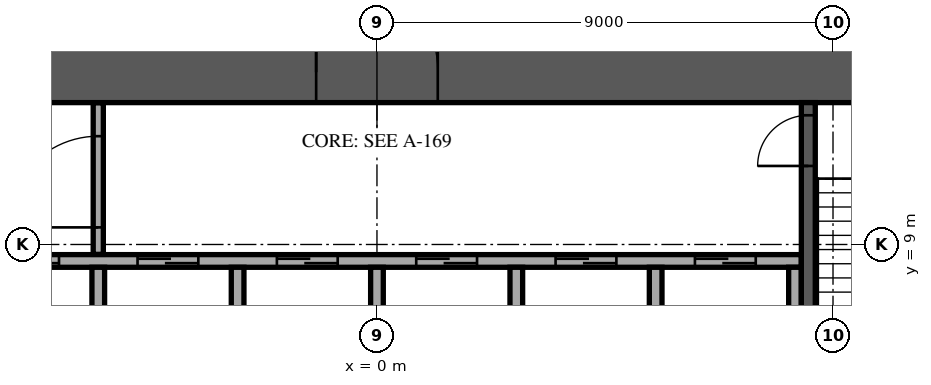
"""IFC4 building model, lengths in metres.
Left out: names, types, materials, properties, quantities, classifications, styles, units other than length and angle.
Written with IfcOpenShell. Run it as: python <this file> out.ifc"""

import sys

from ifc_helpers import new_model, si_unit, direction, frame, frame_2d, origin, place, context, subcontext, project, spatial, rectangle, extrude, element, fill, save


model = new_model("IFC4")
c1 = context("Model", 3, precision=1e-05, world=origin(), true_north=direction((0.0, 1.0)))
c2 = subcontext(c1, "Body", "Model", "MODEL_VIEW")
j1 = project(units=[si_unit("LENGTHUNIT", "METRE"), si_unit("PLANEANGLEUNIT", "RADIAN")], contexts=[c1])
p1 = place(None, origin())
s1 = spatial("IfcSite", under=j1, at=p1, CompositionType="ELEMENT")
p2 = place(p1, origin())
s2 = spatial("IfcBuilding", under=s1, at=p2, CompositionType="ELEMENT")
p3 = place(p2, frame((0.0, 0.0, 27.3)))
s3 = spatial("IfcBuildingStorey", under=s2, at=p3, CompositionType="ELEMENT", Elevation=27.3)
p4 = place(p3, frame((-13.0, 12.4, 0.0), z_axis=(0.0, 0.0, 1.0), x_axis=(1.0, 0.0, 0.0)))
e1 = element("IfcWall", 1, at=p4, inside=s3, PredefinedType="SHEAR", context=c2, shape_type="SweptSolid", body=[
    extrude(rectangle(XDim=26.0, YDim=1.2, at=frame_2d((13.0, 0.0))), origin(), (0.0, 0.0, 1.0), 4.35),
])
p5 = place(p4, frame((11.8, 0.0, 0.0)))
e2 = element("IfcOpeningElement", 2, at=p5, cuts=e1, PredefinedType="OPENING", context=c2, shape_type="SweptSolid", body=[
    extrude(rectangle(XDim=2.4, YDim=2.4, at=frame_2d((1.2, 1.2))), frame((0.0, 0.61, 0.0), z_axis=(0.0, -1.0, 0.0), x_axis=(1.0, 0.0, 0.0)), (0.0, 0.0, 1.0), 1.22),
])
p6 = place(p4, frame((22.625, 0.0, 0.0)))
e3 = element("IfcOpeningElement", 3, at=p6, cuts=e1, PredefinedType="OPENING", context=c2, shape_type="SweptSolid", body=[
    extrude(rectangle(XDim=1.2, YDim=2.1, at=frame_2d((0.6, 1.05))), frame((0.0, 0.61, 0.0), z_axis=(0.0, -1.0, 0.0), x_axis=(1.0, 0.0, 0.0)), (0.0, 0.0, 1.0), 1.22),
])
p7 = place(p4, frame((1.6, 0.0, 0.0)))
e4 = element("IfcOpeningElement", 4, at=p7, cuts=e1, PredefinedType="OPENING", context=c2, shape_type="SweptSolid", body=[
    extrude(rectangle(XDim=1.0, YDim=2.1, at=frame_2d((0.5, 1.05))), frame((0.0, 0.61, 0.0), z_axis=(0.0, -1.0, 0.0), x_axis=(1.0, 0.0, 0.0)), (0.0, 0.0, 1.0), 1.22),
])
p8 = place(p3, frame((-8.375, 8.675, 0.0), z_axis=(0.0, 0.0, 1.0), x_axis=(1.0, 0.0, 0.0)))
e5 = element("IfcWall", 5, at=p8, inside=s3, PredefinedType="SOLIDWALL", context=c2, shape_type="SweptSolid", body=[
    extrude(rectangle(XDim=16.75, YDim=0.25, at=frame_2d((8.375, 0.0))), origin(), (0.0, 0.0, 1.0), 4.35),
])
p9 = place(p8, frame((0.9, 0.0, 0.0)))
e6 = element("IfcOpeningElement", 6, at=p9, cuts=e5, PredefinedType="OPENING", context=c2, shape_type="SweptSolid", body=[
    extrude(rectangle(XDim=1.2, YDim=2.1, at=frame_2d((0.6, 1.05))), frame((0.0, 0.135, 0.0), z_axis=(0.0, -1.0, 0.0), x_axis=(1.0, 0.0, 0.0)), (0.0, 0.0, 1.0), 0.27),
])
p10 = place(p8, frame((3.65, 0.0, 0.0)))
e7 = element("IfcOpeningElement", 7, at=p10, cuts=e5, PredefinedType="OPENING", context=c2, shape_type="SweptSolid", body=[
    extrude(rectangle(XDim=1.2, YDim=2.1, at=frame_2d((0.6, 1.05))), frame((0.0, 0.135, 0.0), z_axis=(0.0, -1.0, 0.0), x_axis=(1.0, 0.0, 0.0)), (0.0, 0.0, 1.0), 0.27),
])
p11 = place(p8, frame((6.4, 0.0, 0.0)))
e8 = element("IfcOpeningElement", 8, at=p11, cuts=e5, PredefinedType="OPENING", context=c2, shape_type="SweptSolid", body=[
    extrude(rectangle(XDim=1.2, YDim=2.1, at=frame_2d((0.6, 1.05))), frame((0.0, 0.135, 0.0), z_axis=(0.0, -1.0, 0.0), x_axis=(1.0, 0.0, 0.0)), (0.0, 0.0, 1.0), 0.27),
])
p12 = place(p8, frame((9.15, 0.0, 0.0)))
e9 = element("IfcOpeningElement", 9, at=p12, cuts=e5, PredefinedType="OPENING", context=c2, shape_type="SweptSolid", body=[
    extrude(rectangle(XDim=1.2, YDim=2.1, at=frame_2d((0.6, 1.05))), frame((0.0, 0.135, 0.0), z_axis=(0.0, -1.0, 0.0), x_axis=(1.0, 0.0, 0.0)), (0.0, 0.0, 1.0), 0.27),
])
p13 = place(p8, frame((11.9, 0.0, 0.0)))
e10 = element("IfcOpeningElement", 10, at=p13, cuts=e5, PredefinedType="OPENING", context=c2, shape_type="SweptSolid", body=[
    extrude(rectangle(XDim=1.2, YDim=2.1, at=frame_2d((0.6, 1.05))), frame((0.0, 0.135, 0.0), z_axis=(0.0, -1.0, 0.0), x_axis=(1.0, 0.0, 0.0)), (0.0, 0.0, 1.0), 0.27),
])
p14 = place(p8, frame((14.65, 0.0, 0.0)))
e11 = element("IfcOpeningElement", 11, at=p14, cuts=e5, PredefinedType="OPENING", context=c2, shape_type="SweptSolid", body=[
    extrude(rectangle(XDim=1.2, YDim=2.1, at=frame_2d((0.6, 1.05))), frame((0.0, 0.135, 0.0), z_axis=(0.0, -1.0, 0.0), x_axis=(1.0, 0.0, 0.0)), (0.0, 0.0, 1.0), 0.27),
])
for number, where, z_axis, x_axis in (
    (12, (-5.5, 5.85, 0.0), (0.0, 0.0, 1.0), (0.0, 1.0, 0.0)),
    (13, (-2.75, 5.85, 0.0), (0.0, 0.0, 1.0), (0.0, 1.0, 0.0)),
    (14, (0.0, 5.85, 0.0), (0.0, 0.0, 1.0), (0.0, 1.0, 0.0)),
    (15, (2.75, 5.85, 0.0), (0.0, 0.0, 1.0), (0.0, 1.0, 0.0)),
    (16, (5.5, 5.85, 0.0), (0.0, 0.0, 1.0), (0.0, 1.0, 0.0)),
    (17, (8.25, 5.85, 0.0), (0.0, 0.0, 1.0), (0.0, 1.0, 0.0)),
):
    element("IfcWall", number, at=place(p3, frame(where, z_axis=z_axis, x_axis=x_axis)), inside=s3, PredefinedType="SOLIDWALL", context=c2, shape_type="SweptSolid", body=[
        extrude(rectangle(XDim=2.7, YDim=0.25, at=frame_2d((1.35, 0.0))), origin(), (0.0, 0.0, 1.0), 4.35),
    ])
p15 = place(p3, frame((8.512, 4.55, 0.0), z_axis=(0.0, 0.0, 1.0), x_axis=(0.0, 1.0, 0.0)))
e18 = element("IfcWall", 18, at=p15, inside=s3, PredefinedType="SOLIDWALL", context=c2, shape_type="SweptSolid", body=[
    extrude(rectangle(XDim=7.25, YDim=0.275, at=frame_2d((3.625, 0.0))), origin(), (0.0, 0.0, 1.0), 4.35),
])
p16 = place(p15, frame((6.0, 0.0, 0.0)))
e19 = element("IfcOpeningElement", 19, at=p16, cuts=e18, PredefinedType="OPENING", context=c2, shape_type="SweptSolid", body=[
    extrude(rectangle(XDim=1.0, YDim=2.1, at=frame_2d((0.5, 1.05))), frame((0.0, 0.147, 0.0), z_axis=(0.0, -1.0, 0.0), x_axis=(1.0, 0.0, 0.0)), (0.0, 0.0, 1.0), 0.295),
])
p17 = place(p3, frame((-5.5, 8.805, 0.0), z_axis=(0.0, 0.0, 1.0), x_axis=(0.0, 1.0, 0.0)))
e20 = element("IfcWall", 20, at=p17, inside=s3, PredefinedType="PARTITIONING", context=c2, shape_type="SweptSolid", body=[
    extrude(rectangle(XDim=2.99, YDim=0.2, at=frame_2d((1.495, 0.0))), origin(), (0.0, 0.0, 1.0), 4.35),
])
p18 = place(p17, frame((0.532, 0.0, 0.0)))
e21 = element("IfcOpeningElement", 21, at=p18, cuts=e20, PredefinedType="OPENING", context=c2, shape_type="SweptSolid", body=[
    extrude(rectangle(XDim=1.8, YDim=2.1, at=frame_2d((0.9, 1.05))), frame((0.0, 0.11, 0.0), z_axis=(0.0, -1.0, 0.0), x_axis=(1.0, 0.0, 0.0)), (0.0, 0.0, 1.0), 0.22),
])
p19 = place(p5, origin())
e22 = element("IfcDoor", 22, at=p19, inside=s3, OperationType="SINGLE_SWING_LEFT", PredefinedType="DOOR", context=c2, shape_type="SweptSolid", body=[
    extrude(rectangle(XDim=2.4, YDim=2.4, at=frame_2d((1.2, 1.2))), frame((0.0, 0.025, 0.0), z_axis=(0.0, -1.0, 0.0), x_axis=(1.0, 0.0, 0.0)), (0.0, 0.0, 1.0), 0.05),
])
fill(e2, e22)
p20 = place(p9, origin())
e23 = element("IfcDoor", 23, at=p20, inside=s3, OperationType="DOUBLE_DOOR_SLIDING", PredefinedType="DOOR", context=c2, shape_type="SweptSolid", body=[
    extrude(rectangle(XDim=1.2, YDim=2.1, at=frame_2d((0.6, 1.05))), frame((0.0, 0.025, 0.0), z_axis=(0.0, -1.0, 0.0), x_axis=(1.0, 0.0, 0.0)), (0.0, 0.0, 1.0), 0.05),
])
fill(e6, e23)
p21 = place(p10, origin())
e24 = element("IfcDoor", 24, at=p21, inside=s3, OperationType="DOUBLE_DOOR_SLIDING", PredefinedType="DOOR", context=c2, shape_type="SweptSolid", body=[
    extrude(rectangle(XDim=1.2, YDim=2.1, at=frame_2d((0.6, 1.05))), frame((0.0, 0.025, 0.0), z_axis=(0.0, -1.0, 0.0), x_axis=(1.0, 0.0, 0.0)), (0.0, 0.0, 1.0), 0.05),
])
fill(e7, e24)
p22 = place(p11, origin())
e25 = element("IfcDoor", 25, at=p22, inside=s3, OperationType="DOUBLE_DOOR_SLIDING", PredefinedType="DOOR", context=c2, shape_type="SweptSolid", body=[
    extrude(rectangle(XDim=1.2, YDim=2.1, at=frame_2d((0.6, 1.05))), frame((0.0, 0.025, 0.0), z_axis=(0.0, -1.0, 0.0), x_axis=(1.0, 0.0, 0.0)), (0.0, 0.0, 1.0), 0.05),
])
fill(e8, e25)
p23 = place(p12, origin())
e26 = element("IfcDoor", 26, at=p23, inside=s3, OperationType="DOUBLE_DOOR_SLIDING", PredefinedType="DOOR", context=c2, shape_type="SweptSolid", body=[
    extrude(rectangle(XDim=1.2, YDim=2.1, at=frame_2d((0.6, 1.05))), frame((0.0, 0.025, 0.0), z_axis=(0.0, -1.0, 0.0), x_axis=(1.0, 0.0, 0.0)), (0.0, 0.0, 1.0), 0.05),
])
fill(e9, e26)
p24 = place(p13, origin())
e27 = element("IfcDoor", 27, at=p24, inside=s3, OperationType="DOUBLE_DOOR_SLIDING", PredefinedType="DOOR", context=c2, shape_type="SweptSolid", body=[
    extrude(rectangle(XDim=1.2, YDim=2.1, at=frame_2d((0.6, 1.05))), frame((0.0, 0.025, 0.0), z_axis=(0.0, -1.0, 0.0), x_axis=(1.0, 0.0, 0.0)), (0.0, 0.0, 1.0), 0.05),
])
fill(e10, e27)
p25 = place(p14, origin())
e28 = element("IfcDoor", 28, at=p25, inside=s3, OperationType="DOUBLE_DOOR_SLIDING", PredefinedType="DOOR", context=c2, shape_type="SweptSolid", body=[
    extrude(rectangle(XDim=1.2, YDim=2.1, at=frame_2d((0.6, 1.05))), frame((0.0, 0.025, 0.0), z_axis=(0.0, -1.0, 0.0), x_axis=(1.0, 0.0, 0.0)), (0.0, 0.0, 1.0), 0.05),
])
fill(e11, e28)
p26 = place(p16, origin())
e29 = element("IfcDoor", 29, at=p26, inside=s3, OperationType="SINGLE_SWING_LEFT", PredefinedType="DOOR", context=c2, shape_type="SweptSolid", body=[
    extrude(rectangle(XDim=1.0, YDim=2.1, at=frame_2d((0.5, 1.05))), frame((0.0, 0.025, 0.0), z_axis=(0.0, -1.0, 0.0), x_axis=(1.0, 0.0, 0.0)), (0.0, 0.0, 1.0), 0.05),
])
fill(e19, e29)
p27 = place(p18, origin())
e30 = element("IfcDoor", 30, at=p27, inside=s3, OperationType="SINGLE_SWING_LEFT", PredefinedType="DOOR", context=c2, shape_type="SweptSolid", body=[
    extrude(rectangle(XDim=1.8, YDim=2.1, at=frame_2d((0.9, 1.05))), frame((0.0, 0.025, 0.0), z_axis=(0.0, -1.0, 0.0), x_axis=(1.0, 0.0, 0.0)), (0.0, 0.0, 1.0), 0.05),
])
fill(e21, e30)
save(model, sys.argv[1])
